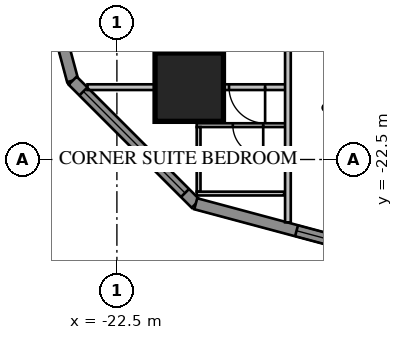
"""IFC4 building model, lengths in metres.
Left out: names, types, materials, properties, quantities, classifications, styles, units other than length and angle.
Written with IfcOpenShell. Run it as: python <this file> out.ifc"""

import sys

from ifc_helpers import new_model, si_unit, direction, frame, frame_2d, origin, origin_2d, place, context, subcontext, project, spatial, rectangle, extrude, element, fill, save


model = new_model("IFC4")
c1 = context("Model", 3, precision=1e-05, world=origin(), true_north=direction((0.0, 1.0)))
c2 = subcontext(c1, "Body", "Model", "MODEL_VIEW")
j1 = project(units=[si_unit("LENGTHUNIT", "METRE"), si_unit("PLANEANGLEUNIT", "RADIAN")], contexts=[c1])
p1 = place(None, origin())
s1 = spatial("IfcSite", under=j1, at=p1, CompositionType="ELEMENT")
p2 = place(p1, origin())
s2 = spatial("IfcBuilding", under=s1, at=p2, CompositionType="ELEMENT")
p3 = place(p2, frame((0.0, 0.0, 27.55)))
s3 = spatial("IfcBuildingStorey", under=s2, at=p3, CompositionType="ELEMENT", Elevation=27.55)
p4 = place(p3, frame((-20.596, -20.596, 0.0), z_axis=(0.0, 0.0, 1.0), x_axis=(1.0, 0.0, 0.0)))
e1 = element("IfcColumn", 1, at=p4, inside=s3, PredefinedType="COLUMN", context=c2, shape_type="SweptSolid", body=[
    extrude(rectangle(XDim=1.8, YDim=1.8, at=origin_2d()), origin(), (0.0, 0.0, 1.0), 3.85),
])
p5 = place(p3, frame((-24.85, -16.0, 0.0), z_axis=(0.0, 0.0, 1.0), x_axis=(0.258839972501, -0.965920218567, 0.0)))
e2 = element("IfcWall", 2, at=p5, inside=s3, PredefinedType="SOLIDWALL", context=c2, shape_type="SweptSolid", body=[
    extrude(rectangle(XDim=4.581, YDim=0.3, at=frame_2d((2.291, 0.0))), origin(), (0.0, 0.0, 1.0), 3.65),
])
p6 = place(p3, frame((-23.664, -20.425, 0.0), z_axis=(0.0, 0.0, 1.0), x_axis=(0.707106781187, -0.707106781187, 0.0)))
e3 = element("IfcWall", 3, at=p6, inside=s3, PredefinedType="SOLIDWALL", context=c2, shape_type="SweptSolid", body=[
    extrude(rectangle(XDim=4.581, YDim=0.3, at=frame_2d((2.291, 0.0))), origin(), (0.0, 0.0, 1.0), 3.65),
])
p7 = place(p6, frame((0.4, 0.0, 0.75)))
e4 = element("IfcOpeningElement", 4, at=p7, cuts=e3, PredefinedType="OPENING", context=c2, shape_type="SweptSolid", body=[
    extrude(rectangle(XDim=3.781, YDim=1.8, at=frame_2d((1.891, 0.9))), frame((0.0, 0.17, 0.0), z_axis=(0.0, -1.0, 0.0), x_axis=(1.0, 0.0, 0.0)), (0.0, 0.0, 1.0), 0.34),
])
p8 = place(p3, frame((-20.425, -23.664, 0.0), z_axis=(0.0, 0.0, 1.0), x_axis=(0.965920218567, -0.258839972501, 0.0)))
e5 = element("IfcWall", 5, at=p8, inside=s3, PredefinedType="SOLIDWALL", context=c2, shape_type="SweptSolid", body=[
    extrude(rectangle(XDim=4.581, YDim=0.3, at=frame_2d((2.291, 0.0))), origin(), (0.0, 0.0, 1.0), 3.65),
])
p9 = place(p8, frame((2.746, 0.0, 0.75)))
e6 = element("IfcOpeningElement", 6, at=p9, cuts=e5, PredefinedType="OPENING", context=c2, shape_type="SweptSolid", body=[
    extrude(rectangle(XDim=1.6, YDim=1.8, at=frame_2d((0.8, 0.9))), frame((0.0, 0.17, 0.0), z_axis=(0.0, -1.0, 0.0), x_axis=(1.0, 0.0, 0.0)), (0.0, 0.0, 1.0), 0.34),
])
p10 = place(p3, frame((-18.065, -21.596, 0.0), z_axis=(0.0, 0.0, 1.0), x_axis=(-1.0, 0.0, 0.0)))
e7 = element("IfcWall", 7, at=p10, inside=s3, PredefinedType="PARTITIONING", context=c2, shape_type="SweptSolid", body=[
    extrude(rectangle(XDim=2.335, YDim=0.1, at=frame_2d((1.167, 0.0))), origin(), (0.0, 0.0, 1.0), 3.65),
])
p11 = place(p10, frame((0.585, 0.0, 0.0)))
e8 = element("IfcOpeningElement", 8, at=p11, cuts=e7, PredefinedType="OPENING", context=c2, shape_type="SweptSolid", body=[
    extrude(rectangle(XDim=0.8, YDim=2.1, at=frame_2d((0.4, 1.05))), frame((0.0, 0.07, 0.0), z_axis=(0.0, -1.0, 0.0), x_axis=(1.0, 0.0, 0.0)), (0.0, 0.0, 1.0), 0.14),
])
p12 = place(p3, frame((-20.35, -21.646, 0.0), z_axis=(0.0, 0.0, 1.0), x_axis=(0.0, -1.0, 0.0)))
e9 = element("IfcWall", 9, at=p12, inside=s3, PredefinedType="PARTITIONING", context=c2, shape_type="SweptSolid", body=[
    extrude(rectangle(XDim=1.7, YDim=0.1, at=frame_2d((0.85, 0.0))), origin(), (0.0, 0.0, 1.0), 3.65),
])
p13 = place(p3, frame((-18.1, -23.396, 0.0), z_axis=(0.0, 0.0, 1.0), x_axis=(-1.0, 0.0, 0.0)))
e10 = element("IfcWall", 10, at=p13, inside=s3, PredefinedType="PARTITIONING", context=c2, shape_type="SweptSolid", body=[
    extrude(rectangle(XDim=2.3, YDim=0.1, at=frame_2d((1.15, 0.0))), origin(), (0.0, 0.0, 1.0), 3.65),
])
p14 = place(p3, frame((-18.065, -20.596, 0.0), z_axis=(0.0, 0.0, 1.0), x_axis=(-1.0, 0.0, 0.0)))
e11 = element("IfcWall", 11, at=p14, inside=s3, PredefinedType="PARTITIONING", context=c2, shape_type="SweptSolid", body=[
    extrude(rectangle(XDim=5.209, YDim=0.15, at=frame_2d((2.604, 0.0))), origin(), (0.0, 0.0, 1.0), 3.65),
])
p15 = place(p14, frame((0.535, 0.0, 0.0)))
e12 = element("IfcOpeningElement", 12, at=p15, cuts=e11, PredefinedType="OPENING", context=c2, shape_type="SweptSolid", body=[
    extrude(rectangle(XDim=0.95, YDim=2.1, at=frame_2d((0.475, 1.05))), frame((0.0, 0.095, 0.0), z_axis=(0.0, -1.0, 0.0), x_axis=(1.0, 0.0, 0.0)), (0.0, 0.0, 1.0), 0.19),
])
p16 = place(p3, frame((-18.0, -18.1, 0.0), z_axis=(0.0, 0.0, 1.0), x_axis=(0.0, -1.0, 0.0)))
e13 = element("IfcWall", 13, at=p16, inside=s3, PredefinedType="PARTITIONING", context=c2, shape_type="SweptSolid", body=[
    extrude(rectangle(XDim=6.053, YDim=0.15, at=frame_2d((3.027, 0.0))), origin(), (0.0, 0.0, 1.0), 3.65),
])
p17 = place(p7, origin())
e14 = element("IfcWindow", 14, at=p17, inside=s3, PartitioningType="SINGLE_PANEL", PredefinedType="WINDOW", context=c2, shape_type="SweptSolid", body=[
    extrude(rectangle(XDim=3.781, YDim=1.8, at=frame_2d((1.891, 0.9))), frame((0.0, 0.03, 0.0), z_axis=(0.0, -1.0, 0.0), x_axis=(1.0, 0.0, 0.0)), (0.0, 0.0, 1.0), 0.06),
])
fill(e4, e14)
p18 = place(p9, origin())
e15 = element("IfcWindow", 15, at=p18, inside=s3, PartitioningType="SINGLE_PANEL", PredefinedType="WINDOW", context=c2, shape_type="SweptSolid", body=[
    extrude(rectangle(XDim=1.6, YDim=1.8, at=frame_2d((0.8, 0.9))), frame((0.0, 0.03, 0.0), z_axis=(0.0, -1.0, 0.0), x_axis=(1.0, 0.0, 0.0)), (0.0, 0.0, 1.0), 0.06),
])
fill(e6, e15)
p19 = place(p11, origin())
e16 = element("IfcDoor", 16, at=p19, inside=s3, OperationType="SINGLE_SWING_LEFT", PredefinedType="DOOR", context=c2, shape_type="SweptSolid", body=[
    extrude(rectangle(XDim=0.8, YDim=2.1, at=frame_2d((0.4, 1.05))), frame((0.0, 0.025, 0.0), z_axis=(0.0, -1.0, 0.0), x_axis=(1.0, 0.0, 0.0)), (0.0, 0.0, 1.0), 0.05),
])
fill(e8, e16)
p20 = place(p15, origin())
e17 = element("IfcDoor", 17, at=p20, inside=s3, OperationType="SINGLE_SWING_LEFT", PredefinedType="DOOR", context=c2, shape_type="SweptSolid", body=[
    extrude(rectangle(XDim=0.95, YDim=2.1, at=frame_2d((0.475, 1.05))), frame((0.0, 0.025, 0.0), z_axis=(0.0, -1.0, 0.0), x_axis=(1.0, 0.0, 0.0)), (0.0, 0.0, 1.0), 0.05),
])
fill(e12, e17)
save(model, sys.argv[1])
